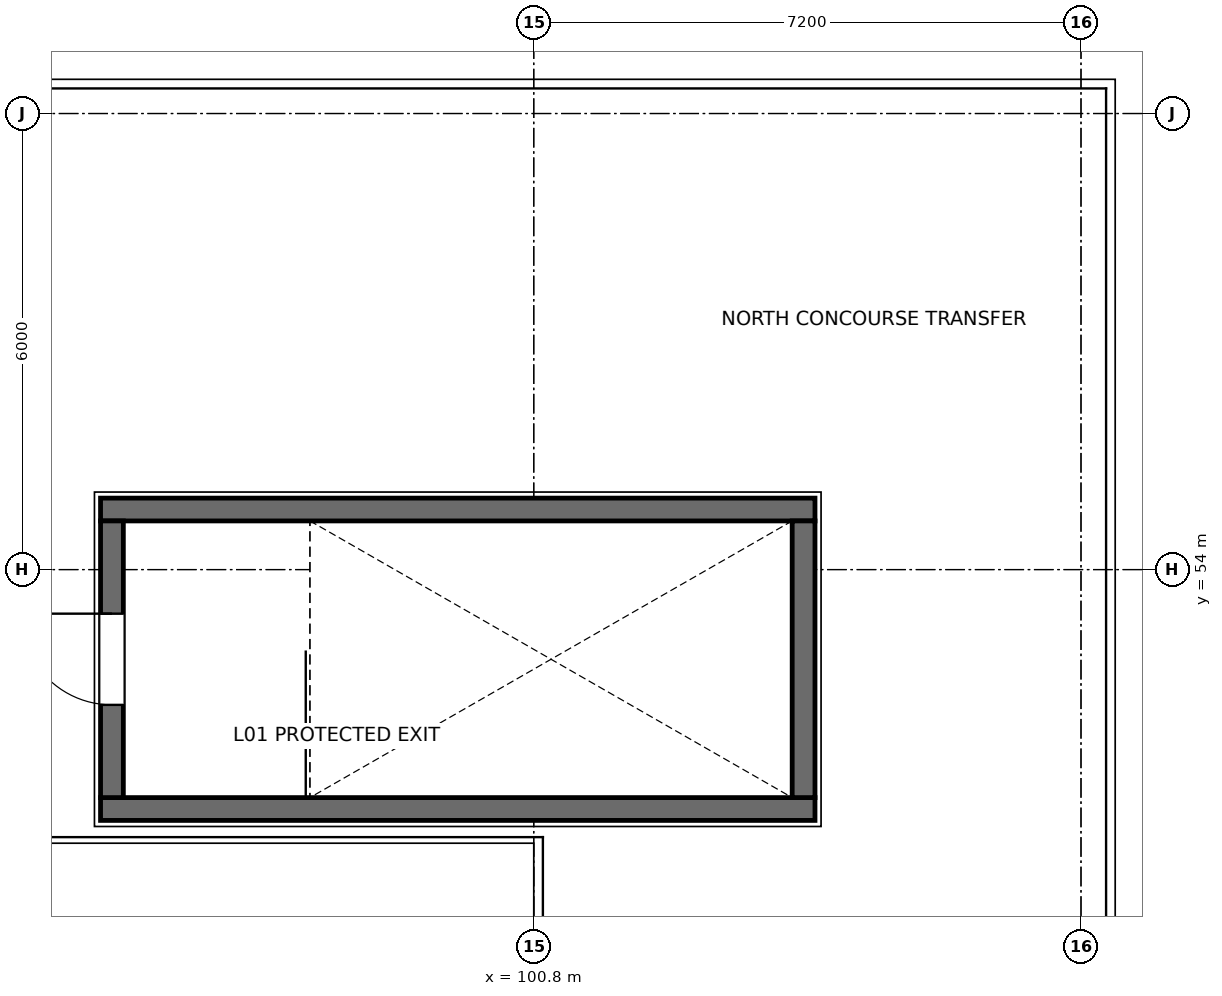
"""IFC4 building model, lengths in metres.
Left out: names, types, materials, properties, quantities, classifications, styles, units other than length and angle.
Written with IfcOpenShell. Run it as: python <this file> out.ifc"""

import sys

from ifc_helpers import new_model, si_unit, direction, frame, frame_2d, origin, place, context, subcontext, project, spatial, rectangle, extrude, element, fill, save


model = new_model("IFC4")
c1 = context("Model", 3, precision=1e-05, world=origin(), true_north=direction((0.0, 1.0)))
c2 = subcontext(c1, "Body", "Model", "MODEL_VIEW")
j1 = project(units=[si_unit("LENGTHUNIT", "METRE"), si_unit("PLANEANGLEUNIT", "RADIAN")], contexts=[c1])
p1 = place(None, origin())
s1 = spatial("IfcSite", under=j1, at=p1, CompositionType="ELEMENT")
p2 = place(p1, origin())
s2 = spatial("IfcBuilding", under=s1, at=p2, CompositionType="ELEMENT")
p3 = place(p2, frame((0.0, 0.0, 5.4)))
s3 = spatial("IfcBuildingStorey", under=s2, at=p3, CompositionType="ELEMENT", Elevation=5.4)
for number, where, z_axis, x_axis in (
    (1, (104.5, 50.85, 0.0), (0.0, 0.0, 1.0), (-1.0, 0.0, 0.0)),
    (2, (95.1, 54.79, 0.0), (0.0, 0.0, 1.0), (1.0, 0.0, 0.0)),
):
    element("IfcWall", number, at=place(p3, frame(where, z_axis=z_axis, x_axis=x_axis)), inside=s3, PredefinedType="SOLIDWALL", context=c2, shape_type="SweptSolid", body=[
        extrude(rectangle(XDim=9.4, YDim=0.3, at=frame_2d((4.7, 0.0))), origin(), (0.0, 0.0, 1.0), 3.2),
    ])
p4 = place(p3, frame((95.25, 51.0, 0.0), z_axis=(0.0, 0.0, 1.0), x_axis=(0.0, 1.0, 0.0)))
e3 = element("IfcWall", 3, at=p4, inside=s3, PredefinedType="SOLIDWALL", context=c2, shape_type="SweptSolid", body=[
    extrude(rectangle(XDim=3.64, YDim=0.3, at=frame_2d((1.82, 0.0))), origin(), (0.0, 0.0, 1.0), 3.2),
])
p5 = place(p4, frame((1.22, 0.0, 0.0)))
e4 = element("IfcOpeningElement", 4, at=p5, cuts=e3, PredefinedType="OPENING", context=c2, shape_type="SweptSolid", body=[
    extrude(rectangle(XDim=1.2, YDim=2.2, at=frame_2d((0.6, 1.1))), frame((0.0, 0.16, 0.0), z_axis=(0.0, -1.0, 0.0), x_axis=(1.0, 0.0, 0.0)), (0.0, 0.0, 1.0), 0.32),
])
p6 = place(p3, frame((104.35, 54.64, 0.0), z_axis=(0.0, 0.0, 1.0), x_axis=(0.0, -1.0, 0.0)))
e5 = element("IfcWall", 5, at=p6, inside=s3, PredefinedType="SOLIDWALL", context=c2, shape_type="SweptSolid", body=[
    extrude(rectangle(XDim=3.64, YDim=0.3, at=frame_2d((1.82, 0.0))), origin(), (0.0, 0.0, 1.0), 3.2),
])
p7 = place(p5, origin())
e6 = element("IfcDoor", 6, at=p7, inside=s3, OperationType="SINGLE_SWING_RIGHT", PredefinedType="DOOR", context=c2, shape_type="SweptSolid", body=[
    extrude(rectangle(XDim=1.2, YDim=2.2, at=frame_2d((0.6, 1.1))), frame((0.0, 0.025, 0.0), z_axis=(0.0, -1.0, 0.0), x_axis=(1.0, 0.0, 0.0)), (0.0, 0.0, 1.0), 0.05),
])
fill(e4, e6)
save(model, sys.argv[1])
